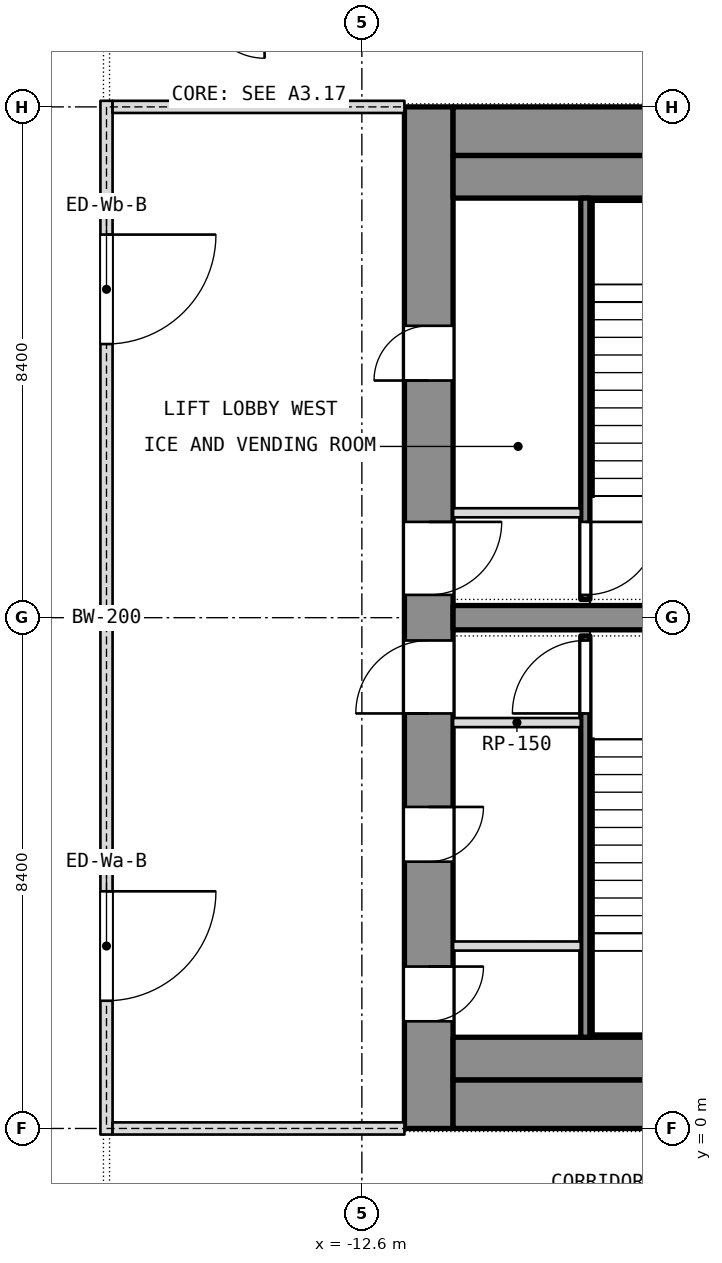
"""IFC4 building model, lengths in metres.
Left out: names, types, materials, properties, quantities, classifications, styles, units other than length and angle.
Written with IfcOpenShell. Run it as: python <this file> out.ifc"""

import sys

from ifc_helpers import new_model, si_unit, direction, frame, frame_2d, origin, place, context, subcontext, project, spatial, rectangle, extrude, element, fill, save


model = new_model("IFC4")
c1 = context("Model", 3, precision=1e-05, world=origin(), true_north=direction((0.0, 1.0)))
c2 = subcontext(c1, "Body", "Model", "MODEL_VIEW")
j1 = project(units=[si_unit("LENGTHUNIT", "METRE"), si_unit("PLANEANGLEUNIT", "RADIAN")], contexts=[c1])
p1 = place(None, origin())
s1 = spatial("IfcSite", under=j1, at=p1, CompositionType="ELEMENT")
p2 = place(p1, origin())
s2 = spatial("IfcBuilding", under=s1, at=p2, CompositionType="ELEMENT")
p3 = place(p2, frame((0.0, 0.0, 209.3)))
s3 = spatial("IfcBuildingStorey", under=s2, at=p3, CompositionType="ELEMENT", Elevation=209.3)
p4 = place(p3, frame((-11.5, 0.0, 0.0), z_axis=(0.0, 0.0, 1.0), x_axis=(0.0, 1.0, 0.0)))
e1 = element("IfcWall", 1, at=p4, inside=s3, PredefinedType="SHEAR", context=c2, shape_type="SweptSolid", body=[
    extrude(rectangle(XDim=16.8, YDim=0.8, at=frame_2d((8.4, 0.0))), origin(), (0.0, 0.0, 1.0), 3.6),
])
p5 = place(p4, frame((1.762, 0.0, 0.0)))
e2 = element("IfcOpeningElement", 2, at=p5, cuts=e1, PredefinedType="OPENING", context=c2, shape_type="SweptSolid", body=[
    extrude(rectangle(XDim=0.9, YDim=2.1, at=frame_2d((0.45, 1.05))), frame((0.0, 0.4, 0.0), z_axis=(0.0, -1.0, 0.0), x_axis=(1.0, 0.0, 0.0)), (0.0, 0.0, 1.0), 0.8),
])
p6 = place(p4, frame((4.387, 0.0, 0.0)))
e3 = element("IfcOpeningElement", 3, at=p6, cuts=e1, PredefinedType="OPENING", context=c2, shape_type="SweptSolid", body=[
    extrude(rectangle(XDim=0.9, YDim=2.1, at=frame_2d((0.45, 1.05))), frame((0.0, 0.4, 0.0), z_axis=(0.0, -1.0, 0.0), x_axis=(1.0, 0.0, 0.0)), (0.0, 0.0, 1.0), 0.8),
])
p7 = place(p4, frame((6.825, 0.0, 0.0)))
e4 = element("IfcOpeningElement", 4, at=p7, cuts=e1, PredefinedType="OPENING", context=c2, shape_type="SweptSolid", body=[
    extrude(rectangle(XDim=1.2, YDim=2.1, at=frame_2d((0.6, 1.05))), frame((0.0, 0.4, 0.0), z_axis=(0.0, -1.0, 0.0), x_axis=(1.0, 0.0, 0.0)), (0.0, 0.0, 1.0), 0.8),
])
p8 = place(p4, frame((12.3, 0.0, 0.0)))
e5 = element("IfcOpeningElement", 5, at=p8, cuts=e1, PredefinedType="OPENING", context=c2, shape_type="SweptSolid", body=[
    extrude(rectangle(XDim=0.9, YDim=2.1, at=frame_2d((0.45, 1.05))), frame((0.0, 0.4, 0.0), z_axis=(0.0, -1.0, 0.0), x_axis=(1.0, 0.0, 0.0)), (0.0, 0.0, 1.0), 0.8),
])
p9 = place(p4, frame((8.775, 0.0, 0.0)))
e6 = element("IfcOpeningElement", 6, at=p9, cuts=e1, PredefinedType="OPENING", context=c2, shape_type="SweptSolid", body=[
    extrude(rectangle(XDim=1.2, YDim=2.1, at=frame_2d((0.6, 1.05))), frame((0.0, 0.4, 0.0), z_axis=(0.0, -1.0, 0.0), x_axis=(1.0, 0.0, 0.0)), (0.0, 0.0, 1.0), 0.8),
])
for number, where, z_axis, x_axis in (
    (7, (-11.1, 0.4, 0.0), (0.0, 0.0, 1.0), (1.0, 0.0, 0.0)),
    (8, (-11.1, 16.4, 0.0), (0.0, 0.0, 1.0), (1.0, 0.0, 0.0)),
):
    element("IfcWall", number, at=place(p3, frame(where, z_axis=z_axis, x_axis=x_axis)), inside=s3, PredefinedType="SHEAR", context=c2, shape_type="SweptSolid", body=[
        extrude(rectangle(XDim=22.2, YDim=0.8, at=frame_2d((11.1, 0.0))), origin(), (0.0, 0.0, 1.0), 3.6),
    ])
p10 = place(p3, frame((-11.1, 8.4, 0.0), z_axis=(0.0, 0.0, 1.0), x_axis=(1.0, 0.0, 0.0)))
e9 = element("IfcWall", 9, at=p10, inside=s3, PredefinedType="SHEAR", context=c2, shape_type="SweptSolid", body=[
    extrude(rectangle(XDim=6.7, YDim=0.4, at=frame_2d((3.35, 0.0))), origin(), (0.0, 0.0, 1.0), 3.6),
])
for number, where, z_axis, x_axis in (
    (10, (-11.1, 1.15, 0.0), (0.0, 0.0, 1.0), (1.0, 0.0, 0.0)),
    (11, (-11.1, 15.65, 0.0), (0.0, 0.0, 1.0), (1.0, 0.0, 0.0)),
):
    element("IfcWall", number, at=place(p3, frame(where, z_axis=z_axis, x_axis=x_axis)), inside=s3, PredefinedType="PARTITIONING", context=c2, shape_type="SweptSolid", body=[
        extrude(rectangle(XDim=22.2, YDim=0.7, at=frame_2d((11.1, 0.0))), origin(), (0.0, 0.0, 1.0), 3.34),
    ])
p11 = place(p3, frame((-8.925, 1.5, 0.0), z_axis=(0.0, 0.0, 1.0), x_axis=(0.0, 1.0, 0.0)))
e12 = element("IfcWall", 12, at=p11, inside=s3, PredefinedType="SHEAR", context=c2, shape_type="SweptSolid", body=[
    extrude(rectangle(XDim=6.6, YDim=0.15, at=frame_2d((3.3, 0.0))), origin(), (0.0, 0.0, 1.0), 3.34),
])
p12 = place(p11, frame((5.325, 0.0, 0.0)))
e13 = element("IfcOpeningElement", 13, at=p12, cuts=e12, PredefinedType="OPENING", context=c2, shape_type="SweptSolid", body=[
    extrude(rectangle(XDim=1.2, YDim=2.1, at=frame_2d((0.6, 1.05))), frame((0.0, 0.075, 0.0), z_axis=(0.0, -1.0, 0.0), x_axis=(1.0, 0.0, 0.0)), (0.0, 0.0, 1.0), 0.15),
])
for number, where, z_axis, x_axis in (
    (14, (-11.1, 6.675, 0.0), (0.0, 0.0, 1.0), (1.0, 0.0, 0.0)),
    (15, (-11.1, 3.0, 0.0), (0.0, 0.0, 1.0), (1.0, 0.0, 0.0)),
):
    element("IfcWall", number, at=place(p3, frame(where, z_axis=z_axis, x_axis=x_axis)), inside=s3, PredefinedType="PARTITIONING", context=c2, shape_type="SweptSolid", body=[
        extrude(rectangle(XDim=2.1, YDim=0.15, at=frame_2d((1.05, 0.0))), origin(), (0.0, 0.0, 1.0), 3.34),
    ])
p13 = place(p3, frame((-8.925, 8.7, 0.0), z_axis=(0.0, 0.0, 1.0), x_axis=(0.0, 1.0, 0.0)))
e16 = element("IfcWall", 16, at=p13, inside=s3, PredefinedType="SHEAR", context=c2, shape_type="SweptSolid", body=[
    extrude(rectangle(XDim=6.6, YDim=0.15, at=frame_2d((3.3, 0.0))), origin(), (0.0, 0.0, 1.0), 3.34),
])
p14 = place(p13, frame((0.075, 0.0, 0.0)))
e17 = element("IfcOpeningElement", 17, at=p14, cuts=e16, PredefinedType="OPENING", context=c2, shape_type="SweptSolid", body=[
    extrude(rectangle(XDim=1.2, YDim=2.1, at=frame_2d((0.6, 1.05))), frame((0.0, 0.075, 0.0), z_axis=(0.0, -1.0, 0.0), x_axis=(1.0, 0.0, 0.0)), (0.0, 0.0, 1.0), 0.15),
])
p15 = place(p3, frame((-11.1, 10.125, 0.0), z_axis=(0.0, 0.0, 1.0), x_axis=(1.0, 0.0, 0.0)))
e18 = element("IfcWall", 18, at=p15, inside=s3, PredefinedType="PARTITIONING", context=c2, shape_type="SweptSolid", body=[
    extrude(rectangle(XDim=2.1, YDim=0.15, at=frame_2d((1.05, 0.0))), origin(), (0.0, 0.0, 1.0), 3.34),
])
p16 = place(p3, frame((-16.8, -0.1, 0.0), z_axis=(0.0, 0.0, 1.0), x_axis=(0.0, 1.0, 0.0)))
e19 = element("IfcWall", 19, at=p16, inside=s3, PredefinedType="PARTITIONING", context=c2, shape_type="SweptSolid", body=[
    extrude(rectangle(XDim=17.0, YDim=0.2, at=frame_2d((8.5, 0.0))), origin(), (0.0, 0.0, 1.0), 3.34),
])
p17 = place(p16, frame((2.2, 0.0, 0.0)))
e20 = element("IfcOpeningElement", 20, at=p17, cuts=e19, PredefinedType="OPENING", context=c2, shape_type="SweptSolid", body=[
    extrude(rectangle(XDim=1.8, YDim=2.1, at=frame_2d((0.9, 1.05))), frame((0.0, 0.1, 0.0), z_axis=(0.0, -1.0, 0.0), x_axis=(1.0, 0.0, 0.0)), (0.0, 0.0, 1.0), 0.2),
])
p18 = place(p16, frame((13.0, 0.0, 0.0)))
e21 = element("IfcOpeningElement", 21, at=p18, cuts=e19, PredefinedType="OPENING", context=c2, shape_type="SweptSolid", body=[
    extrude(rectangle(XDim=1.8, YDim=2.1, at=frame_2d((0.9, 1.05))), frame((0.0, 0.1, 0.0), z_axis=(0.0, -1.0, 0.0), x_axis=(1.0, 0.0, 0.0)), (0.0, 0.0, 1.0), 0.2),
])
for number, where, z_axis, x_axis in (
    (22, (-16.7, 0.0, 0.0), (0.0, 0.0, 1.0), (1.0, 0.0, 0.0)),
    (23, (-16.7, 16.8, 0.0), (0.0, 0.0, 1.0), (1.0, 0.0, 0.0)),
):
    element("IfcWall", number, at=place(p3, frame(where, z_axis=z_axis, x_axis=x_axis)), inside=s3, PredefinedType="PARTITIONING", context=c2, shape_type="SweptSolid", body=[
        extrude(rectangle(XDim=4.8, YDim=0.2, at=frame_2d((2.4, 0.0))), origin(), (0.0, 0.0, 1.0), 2.94),
    ])
p19 = place(p5, origin())
e24 = element("IfcDoor", 24, at=p19, inside=s3, OperationType="SINGLE_SWING_LEFT", PredefinedType="DOOR", context=c2, shape_type="SweptSolid", body=[
    extrude(rectangle(XDim=0.9, YDim=2.1, at=frame_2d((0.45, 1.05))), frame((0.0, 0.025, 0.0), z_axis=(0.0, -1.0, 0.0), x_axis=(1.0, 0.0, 0.0)), (0.0, 0.0, 1.0), 0.05),
])
fill(e2, e24)
p20 = place(p6, origin())
e25 = element("IfcDoor", 25, at=p20, inside=s3, OperationType="SINGLE_SWING_LEFT", PredefinedType="DOOR", context=c2, shape_type="SweptSolid", body=[
    extrude(rectangle(XDim=0.9, YDim=2.1, at=frame_2d((0.45, 1.05))), frame((0.0, 0.025, 0.0), z_axis=(0.0, -1.0, 0.0), x_axis=(1.0, 0.0, 0.0)), (0.0, 0.0, 1.0), 0.05),
])
fill(e3, e25)
p21 = place(p7, origin())
e26 = element("IfcDoor", 26, at=p21, inside=s3, OperationType="SINGLE_SWING_LEFT", PredefinedType="DOOR", context=c2, shape_type="SweptSolid", body=[
    extrude(rectangle(XDim=1.2, YDim=2.1, at=frame_2d((0.6, 1.05))), frame((0.0, 0.025, 0.0), z_axis=(0.0, -1.0, 0.0), x_axis=(1.0, 0.0, 0.0)), (0.0, 0.0, 1.0), 0.05),
])
fill(e4, e26)
p22 = place(p12, origin())
e27 = element("IfcDoor", 27, at=p22, inside=s3, OperationType="SINGLE_SWING_LEFT", PredefinedType="DOOR", context=c2, shape_type="SweptSolid", body=[
    extrude(rectangle(XDim=1.2, YDim=2.1, at=frame_2d((0.6, 1.05))), frame((0.0, 0.025, 0.0), z_axis=(0.0, -1.0, 0.0), x_axis=(1.0, 0.0, 0.0)), (0.0, 0.0, 1.0), 0.05),
])
fill(e13, e27)
p23 = place(p8, origin())
e28 = element("IfcDoor", 28, at=p23, inside=s3, OperationType="SINGLE_SWING_LEFT", PredefinedType="DOOR", context=c2, shape_type="SweptSolid", body=[
    extrude(rectangle(XDim=0.9, YDim=2.1, at=frame_2d((0.45, 1.05))), frame((0.0, 0.025, 0.0), z_axis=(0.0, -1.0, 0.0), x_axis=(1.0, 0.0, 0.0)), (0.0, 0.0, 1.0), 0.05),
])
fill(e5, e28)
p24 = place(p9, origin())
e29 = element("IfcDoor", 29, at=p24, inside=s3, OperationType="SINGLE_SWING_LEFT", PredefinedType="DOOR", context=c2, shape_type="SweptSolid", body=[
    extrude(rectangle(XDim=1.2, YDim=2.1, at=frame_2d((0.6, 1.05))), frame((0.0, 0.025, 0.0), z_axis=(0.0, -1.0, 0.0), x_axis=(1.0, 0.0, 0.0)), (0.0, 0.0, 1.0), 0.05),
])
fill(e6, e29)
p25 = place(p14, origin())
e30 = element("IfcDoor", 30, at=p25, inside=s3, OperationType="SINGLE_SWING_LEFT", PredefinedType="DOOR", context=c2, shape_type="SweptSolid", body=[
    extrude(rectangle(XDim=1.2, YDim=2.1, at=frame_2d((0.6, 1.05))), frame((0.0, 0.025, 0.0), z_axis=(0.0, -1.0, 0.0), x_axis=(1.0, 0.0, 0.0)), (0.0, 0.0, 1.0), 0.05),
])
fill(e17, e30)
p26 = place(p17, origin())
e31 = element("IfcDoor", 31, at=p26, inside=s3, OperationType="DOUBLE_DOOR_SINGLE_SWING", PredefinedType="DOOR", context=c2, shape_type="SweptSolid", body=[
    extrude(rectangle(XDim=1.8, YDim=2.1, at=frame_2d((0.9, 1.05))), frame((0.0, 0.025, 0.0), z_axis=(0.0, -1.0, 0.0), x_axis=(1.0, 0.0, 0.0)), (0.0, 0.0, 1.0), 0.05),
])
fill(e20, e31)
p27 = place(p18, origin())
e32 = element("IfcDoor", 32, at=p27, inside=s3, OperationType="DOUBLE_DOOR_SINGLE_SWING", PredefinedType="DOOR", context=c2, shape_type="SweptSolid", body=[
    extrude(rectangle(XDim=1.8, YDim=2.1, at=frame_2d((0.9, 1.05))), frame((0.0, 0.025, 0.0), z_axis=(0.0, -1.0, 0.0), x_axis=(1.0, 0.0, 0.0)), (0.0, 0.0, 1.0), 0.05),
])
fill(e21, e32)
save(model, sys.argv[1])
